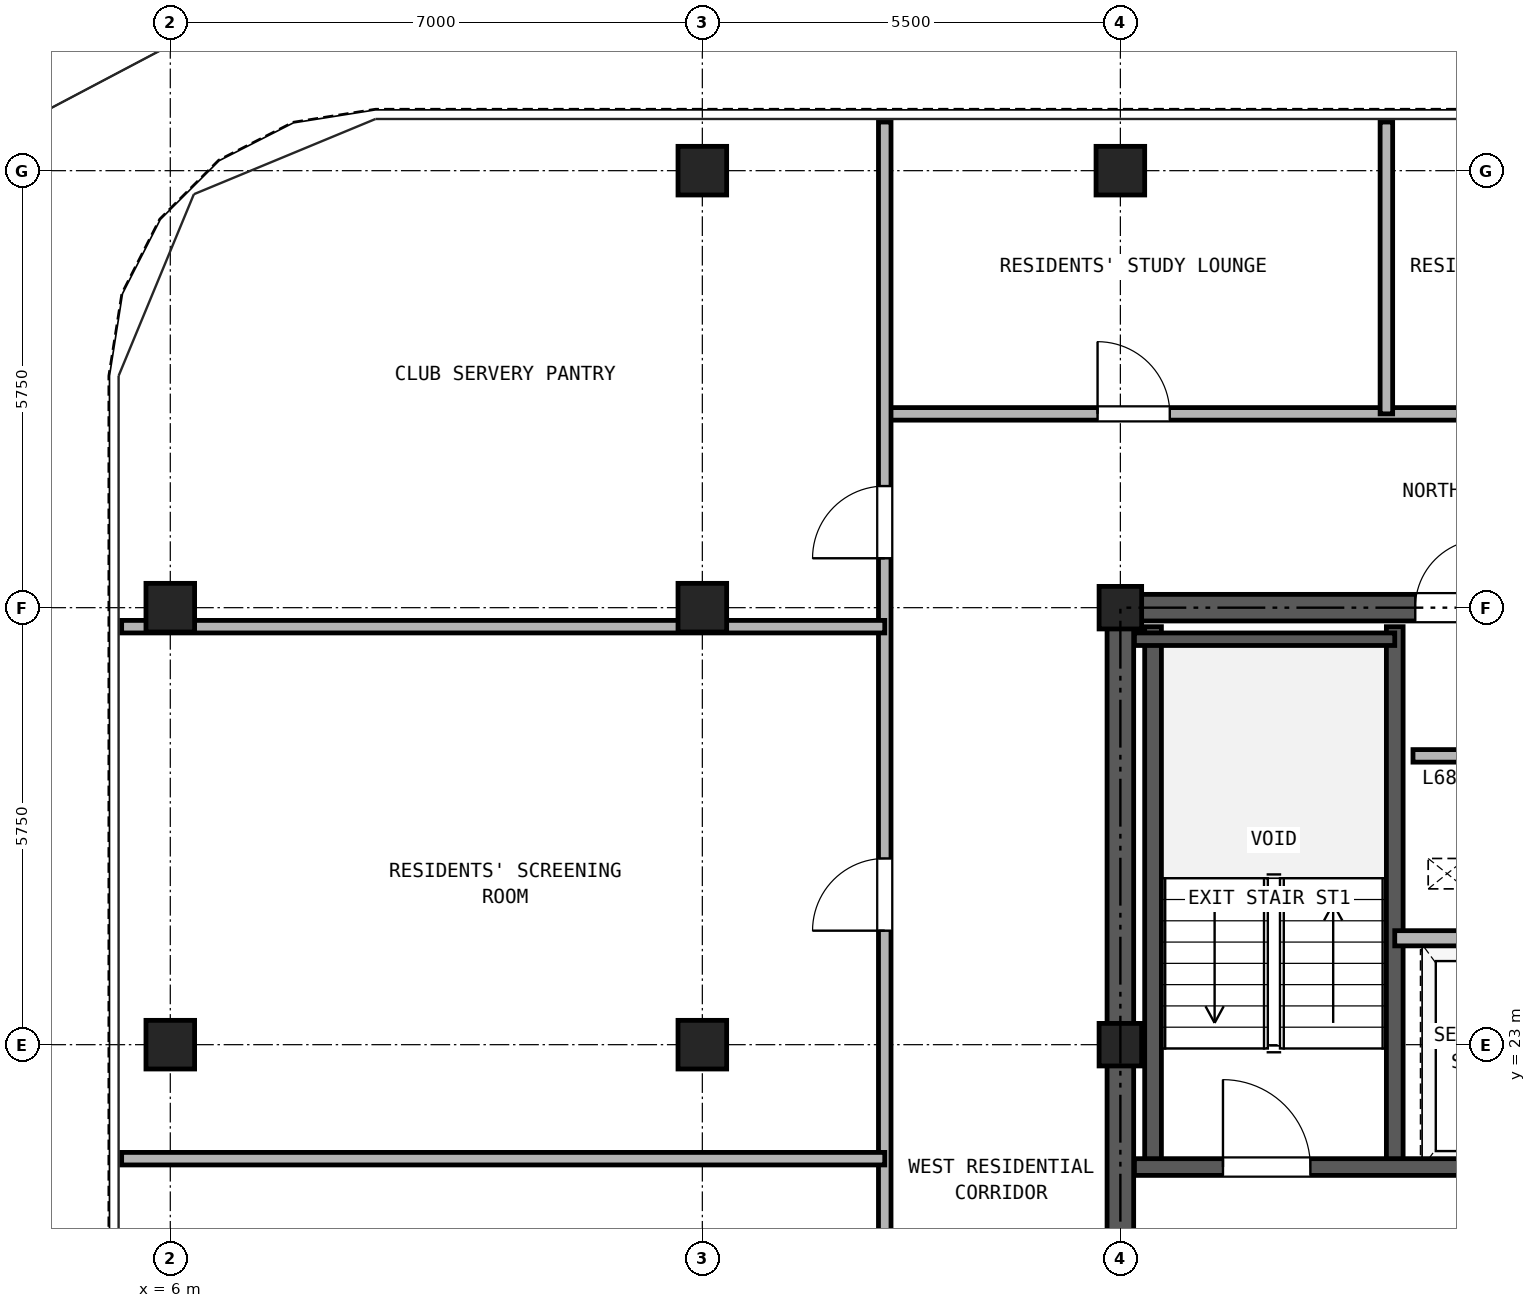
"""IFC4 building model, lengths in metres.
Left out: names, types, materials, properties, quantities, classifications, styles, units other than length and angle.
Written with IfcOpenShell. Run it as: python <this file> out.ifc"""

import sys

from ifc_helpers import new_model, si_unit, direction, frame, frame_2d, origin, origin_2d, place, context, subcontext, project, spatial, rectangle, hollow_rectangle, extrude, source, transform, mapped, element, fill, save


model = new_model("IFC4")
c1 = context("Model", 3, precision=1e-05, world=origin(), true_north=direction((0.0, 1.0)))
c2 = subcontext(c1, "Body", "Model", "MODEL_VIEW")
j1 = project(units=[si_unit("LENGTHUNIT", "METRE"), si_unit("PLANEANGLEUNIT", "RADIAN")], contexts=[c1])
p1 = place(None, origin())
s1 = spatial("IfcSite", under=j1, at=p1, CompositionType="ELEMENT")
p2 = place(p1, origin())
s2 = spatial("IfcBuilding", under=s1, at=p2, CompositionType="ELEMENT")
p3 = place(p2, frame((0.0, 0.0, 239.3)))
s3 = spatial("IfcBuildingStorey", under=s2, at=p3, CompositionType="ELEMENT", Elevation=239.3)
m1 = source(origin(), c2, "Body", "SweptSolid", [
    extrude(hollow_rectangle(XDim=0.64, YDim=0.64, WallThickness=0.035, at=origin_2d()), origin(), (0.0, 0.0, 1.0), 2.98),
])
for number, where, z_axis, x_axis in (
    (1, (13.0, 34.5, 0.0), (0.0, 0.0, 1.0), (1.0, 0.0, 0.0)),
    (2, (18.5, 34.5, 0.0), (0.0, 0.0, 1.0), (1.0, 0.0, 0.0)),
    (3, (6.0, 23.0, 0.0), (0.0, 0.0, 1.0), (1.0, 0.0, 0.0)),
    (4, (6.0, 28.75, 0.0), (0.0, 0.0, 1.0), (1.0, 0.0, 0.0)),
    (5, (13.0, 23.0, 0.0), (0.0, 0.0, 1.0), (1.0, 0.0, 0.0)),
    (6, (13.0, 28.75, 0.0), (0.0, 0.0, 1.0), (1.0, 0.0, 0.0)),
):
    element("IfcColumn", number, at=place(p3, frame(where, z_axis=z_axis, x_axis=x_axis)), inside=s3, PredefinedType="COLUMN", context=c2, shape_type="MappedRepresentation", body=[
        mapped(m1, transform((0.0, 0.0, 0.0), x_axis=(1.0, 0.0, 0.0), y_axis=(0.0, 1.0, 0.0), z_axis=(0.0, 0.0, 1.0), scale=1.0)),
    ])
m2 = source(origin(), c2, "Body", "SweptSolid", [
    extrude(hollow_rectangle(XDim=0.56, YDim=0.56, WallThickness=0.03, at=origin_2d()), origin(), (0.0, 0.0, 1.0), 2.98),
])
for number, where, z_axis, x_axis in (
    (7, (18.5, 23.0, 0.0), (0.0, 0.0, 1.0), (1.0, 0.0, 0.0)),
    (8, (18.5, 28.75, 0.0), (0.0, 0.0, 1.0), (1.0, 0.0, 0.0)),
):
    element("IfcColumn", number, at=place(p3, frame(where, z_axis=z_axis, x_axis=x_axis)), inside=s3, PredefinedType="COLUMN", context=c2, shape_type="MappedRepresentation", body=[
        mapped(m2, transform((0.0, 0.0, 0.0), x_axis=(1.0, 0.0, 0.0), y_axis=(0.0, 1.0, 0.0), z_axis=(0.0, 0.0, 1.0), scale=1.0)),
    ])
p4 = place(p3, frame((18.325, 28.75, 0.0), z_axis=(0.0, 0.0, 1.0), x_axis=(1.0, 0.0, 0.0)))
e9 = element("IfcWall", 9, at=p4, inside=s3, PredefinedType="SHEAR", context=c2, shape_type="SweptSolid", body=[
    extrude(rectangle(XDim=10.35, YDim=0.35, at=frame_2d((5.175, 0.0))), origin(), (0.0, 0.0, 1.0), 2.98),
])
p5 = place(p4, frame((4.055, 0.0, 0.0)))
e10 = element("IfcOpeningElement", 10, at=p5, cuts=e9, PredefinedType="OPENING", context=c2, shape_type="SweptSolid", body=[
    extrude(rectangle(XDim=0.9, YDim=2.05, at=frame_2d((0.45, 1.025))), frame((0.0, 0.185, 0.0), z_axis=(0.0, -1.0, 0.0), x_axis=(1.0, 0.0, 0.0)), (0.0, 0.0, 1.0), 0.37),
])
p6 = place(p4, frame((5.595, 0.0, 0.0)))
e11 = element("IfcOpeningElement", 11, at=p6, cuts=e9, PredefinedType="OPENING", context=c2, shape_type="SweptSolid", body=[
    extrude(rectangle(XDim=0.9, YDim=2.05, at=frame_2d((0.45, 1.025))), frame((0.0, 0.185, 0.0), z_axis=(0.0, -1.0, 0.0), x_axis=(1.0, 0.0, 0.0)), (0.0, 0.0, 1.0), 0.37),
])
p7 = place(p3, frame((18.5, 11.675, 0.0), z_axis=(0.0, 0.0, 1.0), x_axis=(0.0, 1.0, 0.0)))
e12 = element("IfcWall", 12, at=p7, inside=s3, PredefinedType="SHEAR", context=c2, shape_type="SweptSolid", body=[
    extrude(rectangle(XDim=16.9, YDim=0.35, at=frame_2d((8.45, 0.0))), origin(), (0.0, 0.0, 1.0), 2.98),
])
p8 = place(p7, frame((7.475, 0.0, 0.0)))
e13 = element("IfcOpeningElement", 13, at=p8, cuts=e12, PredefinedType="OPENING", context=c2, shape_type="SweptSolid", body=[
    extrude(rectangle(XDim=1.15, YDim=2.2, at=frame_2d((0.575, 1.1))), frame((0.0, 0.185, 0.0), z_axis=(0.0, -1.0, 0.0), x_axis=(1.0, 0.0, 0.0)), (0.0, 0.0, 1.0), 0.37),
])
for number, where, z_axis, x_axis in (
    (14, (18.93, 21.39, 0.0), (0.0, 0.0, 1.0), (0.0, 1.0, 0.0)),
    (15, (22.11, 21.39, 0.0), (0.0, 0.0, 1.0), (0.0, 1.0, 0.0)),
):
    element("IfcWall", number, at=place(p3, frame(where, z_axis=z_axis, x_axis=x_axis)), inside=s3, PredefinedType="SOLIDWALL", context=c2, shape_type="SweptSolid", body=[
        extrude(rectangle(XDim=7.11, YDim=0.22, at=frame_2d((3.555, 0.0))), origin(), (0.0, 0.0, 1.0), 2.98),
    ])
p9 = place(p3, frame((18.685, 28.335, 0.0), z_axis=(0.0, 0.0, 1.0), x_axis=(1.0, 0.0, 0.0)))
e16 = element("IfcWall", 16, at=p9, inside=s3, PredefinedType="PARTITIONING", context=c2, shape_type="SweptSolid", body=[
    extrude(rectangle(XDim=3.425, YDim=0.165, at=frame_2d((1.712, 0.0))), origin(), (0.0, 0.0, 1.0), 2.98),
])
p10 = place(p3, frame((18.685, 21.39, 0.0), z_axis=(0.0, 0.0, 1.0), x_axis=(1.0, 0.0, 0.0)))
e17 = element("IfcWall", 17, at=p10, inside=s3, PredefinedType="SOLIDWALL", context=c2, shape_type="SweptSolid", body=[
    extrude(rectangle(XDim=6.445, YDim=0.22, at=frame_2d((3.222, 0.0))), origin(), (0.0, 0.0, 1.0), 2.98),
])
p11 = place(p10, frame((1.165, 0.0, 0.0)))
e18 = element("IfcOpeningElement", 18, at=p11, cuts=e17, PredefinedType="OPENING", context=c2, shape_type="SweptSolid", body=[
    extrude(rectangle(XDim=1.15, YDim=2.2, at=frame_2d((0.575, 1.1))), frame((0.0, 0.12, 0.0), z_axis=(0.0, -1.0, 0.0), x_axis=(1.0, 0.0, 0.0)), (0.0, 0.0, 1.0), 0.24),
])
p12 = place(p10, frame((4.895, 0.0, 0.0)))
e19 = element("IfcOpeningElement", 19, at=p12, cuts=e17, PredefinedType="OPENING", context=c2, shape_type="SweptSolid", body=[
    extrude(rectangle(XDim=1.1, YDim=2.25, at=frame_2d((0.55, 1.125))), frame((0.0, 0.12, 0.0), z_axis=(0.0, -1.0, 0.0), x_axis=(1.0, 0.0, 0.0)), (0.0, 0.0, 1.0), 0.24),
])
p13 = place(p3, frame((22.11, 24.4, 0.0), z_axis=(0.0, 0.0, 1.0), x_axis=(1.0, 0.0, 0.0)))
e20 = element("IfcWall", 20, at=p13, inside=s3, PredefinedType="PARTITIONING", context=c2, shape_type="SweptSolid", body=[
    extrude(rectangle(XDim=3.02, YDim=0.2, at=frame_2d((1.51, 0.0))), origin(), (0.0, 0.0, 1.0), 2.98),
])
p14 = place(p3, frame((15.4, 31.3, 0.0), z_axis=(0.0, 0.0, 1.0), x_axis=(1.0, 0.0, 0.0)))
e21 = element("IfcWall", 21, at=p14, inside=s3, PredefinedType="PARTITIONING", context=c2, shape_type="SweptSolid", body=[
    extrude(rectangle(XDim=16.2, YDim=0.165, at=frame_2d((8.1, 0.0))), origin(), (0.0, 0.0, 1.0), 2.98),
])
p15 = place(p14, frame((2.8, 0.0, 0.0)))
e22 = element("IfcOpeningElement", 22, at=p15, cuts=e21, PredefinedType="OPENING", context=c2, shape_type="SweptSolid", body=[
    extrude(rectangle(XDim=0.95, YDim=2.15, at=frame_2d((0.475, 1.075))), frame((0.0, 0.093, 0.0), z_axis=(0.0, -1.0, 0.0), x_axis=(1.0, 0.0, 0.0)), (0.0, 0.0, 1.0), 0.185),
])
p16 = place(p14, frame((8.15, 0.0, 0.0)))
e23 = element("IfcOpeningElement", 23, at=p16, cuts=e21, PredefinedType="OPENING", context=c2, shape_type="SweptSolid", body=[
    extrude(rectangle(XDim=0.95, YDim=2.15, at=frame_2d((0.475, 1.075))), frame((0.0, 0.093, 0.0), z_axis=(0.0, -1.0, 0.0), x_axis=(1.0, 0.0, 0.0)), (0.0, 0.0, 1.0), 0.185),
])
p17 = place(p14, frame((12.95, 0.0, 0.0)))
e24 = element("IfcOpeningElement", 24, at=p17, cuts=e21, PredefinedType="OPENING", context=c2, shape_type="SweptSolid", body=[
    extrude(rectangle(XDim=0.92, YDim=2.1, at=frame_2d((0.46, 1.05))), frame((0.0, 0.093, 0.0), z_axis=(0.0, -1.0, 0.0), x_axis=(1.0, 0.0, 0.0)), (0.0, 0.0, 1.0), 0.185),
])
p18 = place(p3, frame((15.4, 10.7, 0.0), z_axis=(0.0, 0.0, 1.0), x_axis=(0.0, 1.0, 0.0)))
e25 = element("IfcWall", 25, at=p18, inside=s3, PredefinedType="PARTITIONING", context=c2, shape_type="SweptSolid", body=[
    extrude(rectangle(XDim=24.44, YDim=0.165, at=frame_2d((12.22, 0.0))), origin(), (0.0, 0.0, 1.0), 2.98),
])
p19 = place(p18, frame((4.9, 0.0, 0.0)))
e26 = element("IfcOpeningElement", 26, at=p19, cuts=e25, PredefinedType="OPENING", context=c2, shape_type="SweptSolid", body=[
    extrude(rectangle(XDim=0.95, YDim=2.15, at=frame_2d((0.475, 1.075))), frame((0.0, 0.093, 0.0), z_axis=(0.0, -1.0, 0.0), x_axis=(1.0, 0.0, 0.0)), (0.0, 0.0, 1.0), 0.185),
])
p20 = place(p18, frame((13.8, 0.0, 0.0)))
e27 = element("IfcOpeningElement", 27, at=p20, cuts=e25, PredefinedType="OPENING", context=c2, shape_type="SweptSolid", body=[
    extrude(rectangle(XDim=0.95, YDim=2.15, at=frame_2d((0.475, 1.075))), frame((0.0, 0.093, 0.0), z_axis=(0.0, -1.0, 0.0), x_axis=(1.0, 0.0, 0.0)), (0.0, 0.0, 1.0), 0.185),
])
p21 = place(p18, frame((18.7, 0.0, 0.0)))
e28 = element("IfcOpeningElement", 28, at=p21, cuts=e25, PredefinedType="OPENING", context=c2, shape_type="SweptSolid", body=[
    extrude(rectangle(XDim=0.95, YDim=2.15, at=frame_2d((0.475, 1.075))), frame((0.0, 0.093, 0.0), z_axis=(0.0, -1.0, 0.0), x_axis=(1.0, 0.0, 0.0)), (0.0, 0.0, 1.0), 0.185),
])
p22 = place(p3, frame((5.36, 21.5, 0.0), z_axis=(0.0, 0.0, 1.0), x_axis=(1.0, 0.0, 0.0)))
e29 = element("IfcWall", 29, at=p22, inside=s3, PredefinedType="PARTITIONING", context=c2, shape_type="SweptSolid", body=[
    extrude(rectangle(XDim=10.04, YDim=0.165, at=frame_2d((5.02, 0.0))), origin(), (0.0, 0.0, 1.0), 2.98),
])
p23 = place(p3, frame((5.36, 28.5, 0.0), z_axis=(0.0, 0.0, 1.0), x_axis=(1.0, 0.0, 0.0)))
e30 = element("IfcWall", 30, at=p23, inside=s3, PredefinedType="PARTITIONING", context=c2, shape_type="SweptSolid", body=[
    extrude(rectangle(XDim=10.04, YDim=0.165, at=frame_2d((5.02, 0.0))), origin(), (0.0, 0.0, 1.0), 2.428),
])
p24 = place(p3, frame((22.0, 31.3, 0.0), z_axis=(0.0, 0.0, 1.0), x_axis=(0.0, 1.0, 0.0)))
e31 = element("IfcWall", 31, at=p24, inside=s3, PredefinedType="PARTITIONING", context=c2, shape_type="SweptSolid", body=[
    extrude(rectangle(XDim=3.84, YDim=0.165, at=frame_2d((1.92, 0.0))), origin(), (0.0, 0.0, 1.0), 2.98),
])
p25 = place(p3, frame((22.35, 26.8, 0.0), z_axis=(0.0, 0.0, 1.0), x_axis=(1.0, 0.0, 0.0)))
e32 = element("IfcWall", 32, at=p25, inside=s3, PredefinedType="PARTITIONING", context=c2, shape_type="SweptSolid", body=[
    extrude(rectangle(XDim=1.1, YDim=0.165, at=frame_2d((0.55, 0.0))), origin(), (0.0, 0.0, 1.0), 2.98),
])
p26 = place(p11, frame((1.15, 0.0, 0.0), z_axis=(0.0, 0.0, 1.0), x_axis=(-1.0, 0.0, 0.0)))
e33 = element("IfcDoor", 33, at=p26, inside=s3, OperationType="SINGLE_SWING_LEFT", PredefinedType="DOOR", context=c2, shape_type="SweptSolid", body=[
    extrude(rectangle(XDim=1.15, YDim=2.2, at=frame_2d((0.575, 1.1))), frame((0.0, 0.025, 0.0), z_axis=(0.0, -1.0, 0.0), x_axis=(1.0, 0.0, 0.0)), (0.0, 0.0, 1.0), 0.05),
])
fill(e18, e33)
p27 = place(p5, origin())
e34 = element("IfcDoor", 34, at=p27, inside=s3, OperationType="SINGLE_SWING_RIGHT", PredefinedType="DOOR", context=c2, shape_type="SweptSolid", body=[
    extrude(rectangle(XDim=0.9, YDim=2.05, at=frame_2d((0.45, 1.025))), frame((0.0, 0.025, 0.0), z_axis=(0.0, -1.0, 0.0), x_axis=(1.0, 0.0, 0.0)), (0.0, 0.0, 1.0), 0.05),
])
fill(e10, e34)
p28 = place(p20, frame((0.95, 0.0, 0.0), z_axis=(0.0, 0.0, 1.0), x_axis=(-1.0, 0.0, 0.0)))
e35 = element("IfcDoor", 35, at=p28, inside=s3, OperationType="SINGLE_SWING_LEFT", PredefinedType="DOOR", context=c2, shape_type="SweptSolid", body=[
    extrude(rectangle(XDim=0.95, YDim=2.15, at=frame_2d((0.475, 1.075))), frame((0.0, 0.025, 0.0), z_axis=(0.0, -1.0, 0.0), x_axis=(1.0, 0.0, 0.0)), (0.0, 0.0, 1.0), 0.05),
])
fill(e27, e35)
p29 = place(p21, frame((0.95, 0.0, 0.0), z_axis=(0.0, 0.0, 1.0), x_axis=(-1.0, 0.0, 0.0)))
e36 = element("IfcDoor", 36, at=p29, inside=s3, OperationType="SINGLE_SWING_LEFT", PredefinedType="DOOR", context=c2, shape_type="SweptSolid", body=[
    extrude(rectangle(XDim=0.95, YDim=2.15, at=frame_2d((0.475, 1.075))), frame((0.0, 0.025, 0.0), z_axis=(0.0, -1.0, 0.0), x_axis=(1.0, 0.0, 0.0)), (0.0, 0.0, 1.0), 0.05),
])
fill(e28, e36)
p30 = place(p15, origin())
e37 = element("IfcDoor", 37, at=p30, inside=s3, OperationType="SINGLE_SWING_LEFT", PredefinedType="DOOR", context=c2, shape_type="SweptSolid", body=[
    extrude(rectangle(XDim=0.95, YDim=2.15, at=frame_2d((0.475, 1.075))), frame((0.0, 0.025, 0.0), z_axis=(0.0, -1.0, 0.0), x_axis=(1.0, 0.0, 0.0)), (0.0, 0.0, 1.0), 0.05),
])
fill(e22, e37)
save(model, sys.argv[1])
